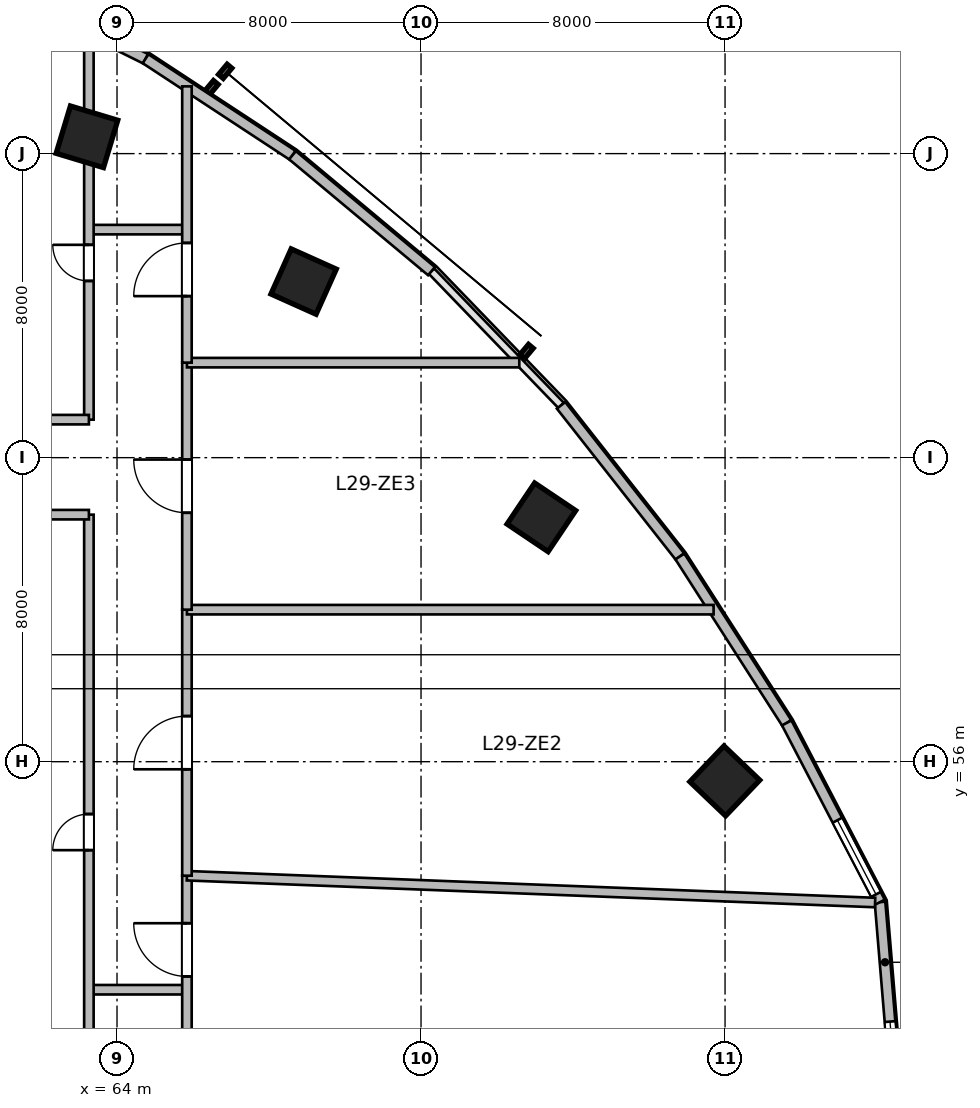
"""IFC4 building model, lengths in metres.
Left out: names, types, materials, properties, quantities, classifications, styles, units other than length and angle.
Written with IfcOpenShell. Run it as: python <this file> out.ifc"""

import sys

from ifc_helpers import new_model, si_unit, direction, frame, frame_2d, origin, origin_2d, place, context, subcontext, project, spatial, rectangle, extrude, source, transform, mapped, element, fill, save


model = new_model("IFC4")
c1 = context("Model", 3, precision=1e-05, world=origin(), true_north=direction((0.0, 1.0)))
c2 = subcontext(c1, "Body", "Model", "MODEL_VIEW")
j1 = project(units=[si_unit("LENGTHUNIT", "METRE"), si_unit("PLANEANGLEUNIT", "RADIAN")], contexts=[c1])
p1 = place(None, origin())
s1 = spatial("IfcSite", under=j1, at=p1, CompositionType="ELEMENT")
p2 = place(p1, origin())
s2 = spatial("IfcBuilding", under=s1, at=p2, CompositionType="ELEMENT")
p3 = place(p2, frame((0.0, 0.0, 123.3)))
s3 = spatial("IfcBuildingStorey", under=s2, at=p3, CompositionType="ELEMENT", Elevation=123.3)
m1 = source(origin(), c2, "Body", "SweptSolid", [
    extrude(rectangle(XDim=1.3, YDim=1.3, at=origin_2d()), origin(), (0.0, 0.0, 1.0), 3.9),
])
for number, where, z_axis, x_axis in (
    (1, (63.209, 72.442, 0.0), (0.0, 0.0, 1.0), (0.289, 0.957, 0.0)),
    (2, (68.91, 68.633, 0.0), (0.0, 0.0, 1.0), (0.409, 0.912, 0.0)),
    (3, (75.167, 62.43, 0.0), (0.0, 0.0, 1.0), (0.558, 0.83, 0.0)),
    (4, (79.993, 55.494, 0.0), (0.0, 0.0, 1.0), (0.691, 0.723, 0.0)),
):
    element("IfcColumn", number, at=place(p3, frame(where, z_axis=z_axis, x_axis=x_axis)), inside=s3, PredefinedType="COLUMN", context=c2, shape_type="MappedRepresentation", body=[
        mapped(m1, transform((0.0, 0.0, 0.0), scale=1.0)),
    ])
m2 = source(origin(), c2, "Body", "SweptSolid", [
    extrude(rectangle(XDim=5.674, YDim=0.28, at=frame_2d((2.837, 0.0))), origin(), (0.0, 0.0, 1.0), 3.65),
])
p4 = place(p3, frame((84.078, 52.305, 0.0), z_axis=(0.0, 0.0, 1.0), x_axis=(0.083309007867, -0.996523762491, 0.0)))
e5 = element("IfcWall", 5, at=p4, inside=s3, PredefinedType="SOLIDWALL", context=c2, shape_type="MappedRepresentation", body=[
    mapped(m2, transform((0.0, 0.0, 0.0), scale=1.0)),
])
p5 = place(p4, frame((3.155, 0.0, 0.95)))
e6 = element("IfcOpeningElement", 6, at=p5, cuts=e5, PredefinedType="OPENING", context=c2, shape_type="SweptSolid", body=[
    extrude(rectangle(XDim=2.2, YDim=2.1, at=frame_2d((1.1, 1.05))), frame((0.0, 0.15, 0.0), z_axis=(0.0, -1.0, 0.0), x_axis=(1.0, 0.0, 0.0)), (0.0, 0.0, 1.0), 0.3),
])
m3 = source(origin(), c2, "Body", "SweptSolid", [
    extrude(rectangle(XDim=4.506, YDim=0.28, at=frame_2d((2.253, 0.0))), origin(), (0.0, 0.0, 1.0), 3.65),
])
p6 = place(p3, frame((60.714, 76.497, 0.0), z_axis=(0.0, 0.0, 1.0), x_axis=(0.89597155075, -0.444111450254, 0.0)))
e7 = element("IfcWall", 7, at=p6, inside=s3, PredefinedType="SOLIDWALL", context=c2, shape_type="MappedRepresentation", body=[
    mapped(m3, transform((0.0, 0.0, 0.0), scale=1.0)),
])
m4 = source(origin(), c2, "Body", "SweptSolid", [
    extrude(rectangle(XDim=4.626, YDim=0.28, at=frame_2d((2.313, 0.0))), origin(), (0.0, 0.0, 1.0), 3.65),
])
p7 = place(p3, frame((64.751, 74.496, 0.0), z_axis=(0.0, 0.0, 1.0), x_axis=(0.83595938331, -0.548791316855, 0.0)))
e8 = element("IfcWall", 8, at=p7, inside=s3, PredefinedType="SOLIDWALL", context=c2, shape_type="MappedRepresentation", body=[
    mapped(m4, transform((0.0, 0.0, 0.0), scale=1.0)),
])
m5 = source(origin(), c2, "Body", "SweptSolid", [
    extrude(rectangle(XDim=4.762, YDim=0.28, at=frame_2d((2.381, 0.0))), origin(), (0.0, 0.0, 1.0), 3.65),
])
p8 = place(p3, frame((68.618, 71.958, 0.0), z_axis=(0.0, 0.0, 1.0), x_axis=(0.767952279762, -0.640507061638, 0.0)))
e9 = element("IfcWall", 9, at=p8, inside=s3, PredefinedType="SOLIDWALL", context=c2, shape_type="MappedRepresentation", body=[
    mapped(m5, transform((0.0, 0.0, 0.0), scale=1.0)),
])
m6 = source(origin(), c2, "Body", "SweptSolid", [
    extrude(rectangle(XDim=5.058, YDim=0.28, at=frame_2d((2.529, 0.0))), origin(), (0.0, 0.0, 1.0), 3.65),
])
p9 = place(p3, frame((75.685, 65.376, 0.0), z_axis=(0.0, 0.0, 1.0), x_axis=(0.618145507434, -0.786063694391, 0.0)))
e10 = element("IfcWall", 10, at=p9, inside=s3, PredefinedType="SOLIDWALL", context=c2, shape_type="MappedRepresentation", body=[
    mapped(m6, transform((0.0, 0.0, 0.0), scale=1.0)),
])
m7 = source(origin(), c2, "Body", "SweptSolid", [
    extrude(rectangle(XDim=5.205, YDim=0.28, at=frame_2d((2.603, 0.0))), origin(), (0.0, 0.0, 1.0), 3.65),
])
p10 = place(p3, frame((78.812, 61.4, 0.0), z_axis=(0.0, 0.0, 1.0), x_axis=(0.540188528895, -0.8415440293, 0.0)))
e11 = element("IfcWall", 11, at=p10, inside=s3, PredefinedType="SOLIDWALL", context=c2, shape_type="MappedRepresentation", body=[
    mapped(m7, transform((0.0, 0.0, 0.0), scale=1.0)),
])
m8 = source(origin(), c2, "Body", "SweptSolid", [
    extrude(rectangle(XDim=5.315, YDim=0.28, at=frame_2d((2.658, 0.0))), origin(), (0.0, 0.0, 1.0), 3.65),
])
p11 = place(p3, frame((81.623, 57.02, 0.0), z_axis=(0.0, 0.0, 1.0), x_axis=(0.461760527822, -0.887004630735, 0.0)))
e12 = element("IfcWall", 12, at=p11, inside=s3, PredefinedType="SOLIDWALL", context=c2, shape_type="MappedRepresentation", body=[
    mapped(m8, transform((0.0, 0.0, 0.0), scale=1.0)),
])
p12 = place(p11, frame((2.886, 0.0, 0.95)))
e13 = element("IfcOpeningElement", 13, at=p12, cuts=e12, PredefinedType="OPENING", context=c2, shape_type="SweptSolid", body=[
    extrude(rectangle(XDim=2.2, YDim=2.1, at=frame_2d((1.1, 1.05))), frame((0.0, 0.15, 0.0), z_axis=(0.0, -1.0, 0.0), x_axis=(1.0, 0.0, 0.0)), (0.0, 0.0, 1.0), 0.3),
])
m9 = source(origin(), c2, "Body", "SweptSolid", [
    extrude(rectangle(XDim=2.5, YDim=0.25, at=frame_2d((1.25, 0.0))), origin(), (0.0, 0.0, 1.0), 3.65),
])
for number, where, z_axis, x_axis in (
    (14, (63.3, 50.0, 0.0), (0.0, 0.0, 1.0), (1.0, 0.0, 0.0)),
    (15, (63.3, 70.0, 0.0), (0.0, 0.0, 1.0), (1.0, 0.0, 0.0)),
):
    element("IfcWall", number, at=place(p3, frame(where, z_axis=z_axis, x_axis=x_axis)), inside=s3, PredefinedType="PARTITIONING", context=c2, shape_type="MappedRepresentation", body=[
        mapped(m9, transform((0.0, 0.0, 0.0), scale=1.0)),
    ])
m10 = source(origin(), c2, "Body", "SweptSolid", [
    extrude(rectangle(XDim=10.726, YDim=0.25, at=frame_2d((5.363, 0.0))), origin(), (0.0, 0.0, 1.0), 2.942),
])
p13 = place(p3, frame((65.84, 42.274, 0.0), z_axis=(0.0, 0.0, 1.0), x_axis=(0.0, 1.0, 0.0)))
e16 = element("IfcWall", 16, at=p13, inside=s3, PredefinedType="PARTITIONING", context=c2, shape_type="MappedRepresentation", body=[
    mapped(m10, transform((0.0, 0.0, 0.0), scale=1.0)),
])
p14 = place(p13, frame((8.076, 0.0, 0.0)))
e17 = element("IfcOpeningElement", 17, at=p14, cuts=e16, PredefinedType="OPENING", context=c2, shape_type="SweptSolid", body=[
    extrude(rectangle(XDim=1.4, YDim=2.15, at=frame_2d((0.7, 1.075))), frame((0.0, 0.135, 0.0), z_axis=(0.0, -1.0, 0.0), x_axis=(1.0, 0.0, 0.0)), (0.0, 0.0, 1.0), 0.27),
])
m11 = source(origin(), c2, "Body", "SweptSolid", [
    extrude(rectangle(XDim=18.122, YDim=0.25, at=frame_2d((9.061, 0.0))), origin(), (0.0, 0.0, 1.0), 3.65),
])
p15 = place(p3, frame((65.84, 53.0, 0.0), z_axis=(0.0, 0.0, 1.0), x_axis=(0.999241241773, -0.038947923447, 0.0)))
e18 = element("IfcWall", 18, at=p15, inside=s3, PredefinedType="PARTITIONING", context=c2, shape_type="MappedRepresentation", body=[
    mapped(m11, transform((0.0, 0.0, 0.0), scale=1.0)),
])
m12 = source(origin(), c2, "Body", "SweptSolid", [
    extrude(rectangle(XDim=7.0, YDim=0.25, at=frame_2d((3.5, 0.0))), origin(), (0.0, 0.0, 1.0), 3.093),
])
p16 = place(p3, frame((65.84, 53.0, 0.0), z_axis=(0.0, 0.0, 1.0), x_axis=(0.0, 1.0, 0.0)))
e19 = element("IfcWall", 19, at=p16, inside=s3, PredefinedType="PARTITIONING", context=c2, shape_type="MappedRepresentation", body=[
    mapped(m12, transform((0.0, 0.0, 0.0), scale=1.0)),
])
p17 = place(p16, frame((2.8, 0.0, 0.0)))
e20 = element("IfcOpeningElement", 20, at=p17, cuts=e19, PredefinedType="OPENING", context=c2, shape_type="SweptSolid", body=[
    extrude(rectangle(XDim=1.4, YDim=2.15, at=frame_2d((0.7, 1.075))), frame((0.0, 0.135, 0.0), z_axis=(0.0, -1.0, 0.0), x_axis=(1.0, 0.0, 0.0)), (0.0, 0.0, 1.0), 0.27),
])
m13 = source(origin(), c2, "Body", "SweptSolid", [
    extrude(rectangle(XDim=13.858, YDim=0.25, at=frame_2d((6.929, 0.0))), origin(), (0.0, 0.0, 1.0), 3.65),
])
p18 = place(p3, frame((65.84, 60.0, 0.0), z_axis=(0.0, 0.0, 1.0), x_axis=(1.0, 0.0, 0.0)))
e21 = element("IfcWall", 21, at=p18, inside=s3, PredefinedType="PARTITIONING", context=c2, shape_type="MappedRepresentation", body=[
    mapped(m13, transform((0.0, 0.0, 0.0), scale=1.0)),
])
m14 = source(origin(), c2, "Body", "SweptSolid", [
    extrude(rectangle(XDim=6.5, YDim=0.25, at=frame_2d((3.25, 0.0))), origin(), (0.0, 0.0, 1.0), 2.942),
])
p19 = place(p3, frame((65.84, 60.0, 0.0), z_axis=(0.0, 0.0, 1.0), x_axis=(0.0, 1.0, 0.0)))
e22 = element("IfcWall", 22, at=p19, inside=s3, PredefinedType="PARTITIONING", context=c2, shape_type="MappedRepresentation", body=[
    mapped(m14, transform((0.0, 0.0, 0.0), scale=1.0)),
])
p20 = place(p19, frame((2.55, 0.0, 0.0)))
e23 = element("IfcOpeningElement", 23, at=p20, cuts=e22, PredefinedType="OPENING", context=c2, shape_type="SweptSolid", body=[
    extrude(rectangle(XDim=1.4, YDim=2.15, at=frame_2d((0.7, 1.075))), frame((0.0, 0.135, 0.0), z_axis=(0.0, -1.0, 0.0), x_axis=(1.0, 0.0, 0.0)), (0.0, 0.0, 1.0), 0.27),
])
m15 = source(origin(), c2, "Body", "SweptSolid", [
    extrude(rectangle(XDim=8.746, YDim=0.25, at=frame_2d((4.373, 0.0))), origin(), (0.0, 0.0, 1.0), 3.65),
])
p21 = place(p3, frame((65.84, 66.5, 0.0), z_axis=(0.0, 0.0, 1.0), x_axis=(1.0, 0.0, 0.0)))
e24 = element("IfcWall", 24, at=p21, inside=s3, PredefinedType="PARTITIONING", context=c2, shape_type="MappedRepresentation", body=[
    mapped(m15, transform((0.0, 0.0, 0.0), scale=1.0)),
])
m16 = source(origin(), c2, "Body", "SweptSolid", [
    extrude(rectangle(XDim=7.27, YDim=0.25, at=frame_2d((3.635, 0.0))), origin(), (0.0, 0.0, 1.0), 3.65),
])
p22 = place(p3, frame((65.84, 66.5, 0.0), z_axis=(0.0, 0.0, 1.0), x_axis=(0.0, 1.0, 0.0)))
e25 = element("IfcWall", 25, at=p22, inside=s3, PredefinedType="PARTITIONING", context=c2, shape_type="MappedRepresentation", body=[
    mapped(m16, transform((0.0, 0.0, 0.0), scale=1.0)),
])
p23 = place(p22, frame((1.75, 0.0, 0.0)))
e26 = element("IfcOpeningElement", 26, at=p23, cuts=e25, PredefinedType="OPENING", context=c2, shape_type="SweptSolid", body=[
    extrude(rectangle(XDim=1.4, YDim=2.15, at=frame_2d((0.7, 1.075))), frame((0.0, 0.135, 0.0), z_axis=(0.0, -1.0, 0.0), x_axis=(1.0, 0.0, 0.0)), (0.0, 0.0, 1.0), 0.27),
])
m17 = source(origin(), c2, "Body", "SweptSolid", [
    extrude(rectangle(XDim=16.706, YDim=0.25, at=frame_2d((8.353, 0.0))), origin(), (0.0, 0.0, 1.0), 2.942),
])
p24 = place(p3, frame((63.26, 45.794, 0.0), z_axis=(0.0, 0.0, 1.0), x_axis=(0.0, 1.0, 0.0)))
e27 = element("IfcWall", 27, at=p24, inside=s3, PredefinedType="PARTITIONING", context=c2, shape_type="MappedRepresentation", body=[
    mapped(m17, transform((0.0, 0.0, 0.0), scale=1.0)),
])
p25 = place(p24, frame((7.878, 0.0, 0.0)))
e28 = element("IfcOpeningElement", 28, at=p25, cuts=e27, PredefinedType="OPENING", context=c2, shape_type="SweptSolid", body=[
    extrude(rectangle(XDim=0.95, YDim=2.1, at=frame_2d((0.475, 1.05))), frame((0.0, 0.135, 0.0), z_axis=(0.0, -1.0, 0.0), x_axis=(1.0, 0.0, 0.0)), (0.0, 0.0, 1.0), 0.27),
])
m18 = source(origin(), c2, "Body", "SweptSolid", [
    extrude(rectangle(XDim=3.76, YDim=0.25, at=frame_2d((1.88, 0.0))), origin(), (0.0, 0.0, 1.0), 3.65),
])
p26 = place(p3, frame((59.5, 62.5, 0.0), z_axis=(0.0, 0.0, 1.0), x_axis=(1.0, 0.0, 0.0)))
e29 = element("IfcWall", 29, at=p26, inside=s3, PredefinedType="PARTITIONING", context=c2, shape_type="MappedRepresentation", body=[
    mapped(m18, transform((0.0, 0.0, 0.0), scale=1.0)),
])
m19 = source(origin(), c2, "Body", "SweptSolid", [
    extrude(rectangle(XDim=10.224, YDim=0.25, at=frame_2d((5.112, 0.0))), origin(), (0.0, 0.0, 1.0), 3.65),
])
p27 = place(p3, frame((63.26, 65.0, 0.0), z_axis=(0.0, 0.0, 1.0), x_axis=(0.0, 1.0, 0.0)))
e30 = element("IfcWall", 30, at=p27, inside=s3, PredefinedType="PARTITIONING", context=c2, shape_type="MappedRepresentation", body=[
    mapped(m19, transform((0.0, 0.0, 0.0), scale=1.0)),
])
p28 = place(p27, frame((3.65, 0.0, 0.0)))
e31 = element("IfcOpeningElement", 31, at=p28, cuts=e30, PredefinedType="OPENING", context=c2, shape_type="SweptSolid", body=[
    extrude(rectangle(XDim=0.95, YDim=2.1, at=frame_2d((0.475, 1.05))), frame((0.0, 0.135, 0.0), z_axis=(0.0, -1.0, 0.0), x_axis=(1.0, 0.0, 0.0)), (0.0, 0.0, 1.0), 0.27),
])
m20 = source(origin(), c2, "Body", "SweptSolid", [
    extrude(rectangle(XDim=1.66, YDim=0.25, at=frame_2d((0.83, 0.0))), origin(), (0.0, 0.0, 1.0), 3.65),
])
p29 = place(p3, frame((61.6, 65.0, 0.0), z_axis=(0.0, 0.0, 1.0), x_axis=(1.0, 0.0, 0.0)))
e32 = element("IfcWall", 32, at=p29, inside=s3, PredefinedType="PARTITIONING", context=c2, shape_type="MappedRepresentation", body=[
    mapped(m20, transform((0.0, 0.0, 0.0), scale=1.0)),
])
m21 = source(origin(), c2, "Body", "SweptSolid", [
    extrude(rectangle(XDim=2.2, YDim=2.1, at=frame_2d((1.1, 1.05))), frame((0.0, 0.03, 0.0), z_axis=(0.0, -1.0, 0.0), x_axis=(1.0, 0.0, 0.0)), (0.0, 0.0, 1.0), 0.06),
])
p30 = place(p5, origin())
e33 = element("IfcWindow", 33, at=p30, inside=s3, PartitioningType="TRIPLE_PANEL_VERTICAL", PredefinedType="WINDOW", context=c2, shape_type="MappedRepresentation", body=[
    mapped(m21, transform((0.0, 0.0, 0.0), scale=1.0)),
])
fill(e6, e33)
p31 = place(p12, origin())
e34 = element("IfcWindow", 34, at=p31, inside=s3, PartitioningType="TRIPLE_PANEL_VERTICAL", PredefinedType="WINDOW", context=c2, shape_type="MappedRepresentation", body=[
    mapped(m21, transform((0.0, 0.0, 0.0), scale=1.0)),
])
fill(e13, e34)
m22 = source(origin(), c2, "Body", "SweptSolid", [
    extrude(rectangle(XDim=1.4, YDim=2.15, at=frame_2d((0.7, 1.075))), frame((0.0, 0.025, 0.0), z_axis=(0.0, -1.0, 0.0), x_axis=(1.0, 0.0, 0.0)), (0.0, 0.0, 1.0), 0.05),
])
p32 = place(p14, origin())
e35 = element("IfcDoor", 35, at=p32, inside=s3, OperationType="SINGLE_SWING_RIGHT", PredefinedType="DOOR", context=c2, shape_type="MappedRepresentation", body=[
    mapped(m22, transform((0.0, 0.0, 0.0), scale=1.0)),
])
fill(e17, e35)
p33 = place(p17, origin())
e36 = element("IfcDoor", 36, at=p33, inside=s3, OperationType="SINGLE_SWING_LEFT", PredefinedType="DOOR", context=c2, shape_type="MappedRepresentation", body=[
    mapped(m22, transform((0.0, 0.0, 0.0), scale=1.0)),
])
fill(e20, e36)
p34 = place(p20, origin())
e37 = element("IfcDoor", 37, at=p34, inside=s3, OperationType="SINGLE_SWING_RIGHT", PredefinedType="DOOR", context=c2, shape_type="MappedRepresentation", body=[
    mapped(m22, transform((0.0, 0.0, 0.0), scale=1.0)),
])
fill(e23, e37)
p35 = place(p23, origin())
e38 = element("IfcDoor", 38, at=p35, inside=s3, OperationType="SINGLE_SWING_LEFT", PredefinedType="DOOR", context=c2, shape_type="MappedRepresentation", body=[
    mapped(m22, transform((0.0, 0.0, 0.0), scale=1.0)),
])
fill(e26, e38)
m23 = source(origin(), c2, "Body", "SweptSolid", [
    extrude(rectangle(XDim=0.95, YDim=2.1, at=frame_2d((0.475, 1.05))), frame((0.0, 0.025, 0.0), z_axis=(0.0, -1.0, 0.0), x_axis=(1.0, 0.0, 0.0)), (0.0, 0.0, 1.0), 0.05),
])
p36 = place(p25, origin())
e39 = element("IfcDoor", 39, at=p36, inside=s3, OperationType="SINGLE_SWING_LEFT", PredefinedType="DOOR", context=c2, shape_type="MappedRepresentation", body=[
    mapped(m23, transform((0.0, 0.0, 0.0), scale=1.0)),
])
fill(e28, e39)
p37 = place(p28, origin())
e40 = element("IfcDoor", 40, at=p37, inside=s3, OperationType="SINGLE_SWING_RIGHT", PredefinedType="DOOR", context=c2, shape_type="MappedRepresentation", body=[
    mapped(m23, transform((0.0, 0.0, 0.0), scale=1.0)),
])
fill(e31, e40)
save(model, sys.argv[1])
